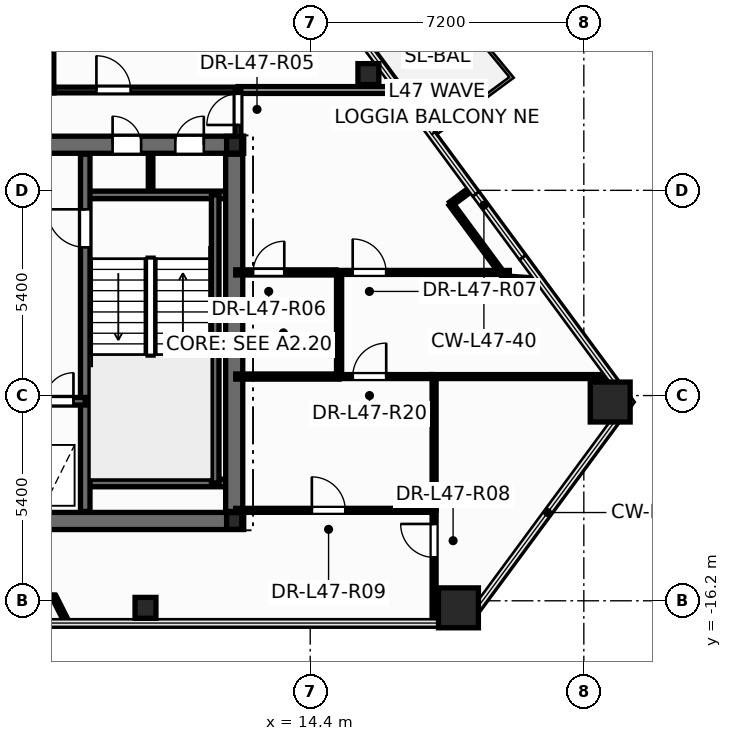
"""IFC4 building model, lengths in metres.
Left out: names, types, materials, properties, quantities, classifications, styles, units other than length and angle.
Written with IfcOpenShell. Run it as: python <this file> out.ifc"""

import sys

from ifc_helpers import new_model, si_unit, direction, frame, frame_2d, origin, origin_2d, place, context, subcontext, project, spatial, rectangle, hollow_rectangle, hollow_circle, i_section, extrude, element, fill, save


model = new_model("IFC4")
c1 = context("Model", 3, precision=1e-05, world=origin(), true_north=direction((0.0, 1.0)))
c2 = subcontext(c1, "Body", "Model", "MODEL_VIEW")
j1 = project(units=[si_unit("LENGTHUNIT", "METRE"), si_unit("PLANEANGLEUNIT", "RADIAN")], contexts=[c1])
p1 = place(None, origin())
s1 = spatial("IfcSite", under=j1, at=p1, CompositionType="ELEMENT")
p2 = place(p1, origin())
s2 = spatial("IfcBuilding", under=s1, at=p2, CompositionType="ELEMENT")
p3 = place(p2, frame((0.0, 0.0, 182.1)))
s3 = spatial("IfcBuildingStorey", under=s2, at=p3, CompositionType="ELEMENT", Elevation=182.1)
for number, where, z_axis, x_axis in (
    (1, (18.301, -16.385, 0.0), (0.0, 0.0, 1.0), (1.0, 0.0, 0.0)),
    (2, (22.294, -10.97, 0.0), (0.0, 0.0, 1.0), (1.0, 0.0, 0.0)),
):
    element("IfcColumn", number, at=place(p3, frame(where, z_axis=z_axis, x_axis=x_axis)), inside=s3, PredefinedType="COLUMN", context=c2, shape_type="SweptSolid", body=[
        extrude(hollow_rectangle(XDim=1.05, YDim=1.05, WallThickness=0.045, at=origin_2d()), origin(), (0.0, 0.0, 1.0), 3.6),
    ])
for number, where, z_axis, x_axis in (
    (3, (10.065, -16.385, 0.0), (0.0, 0.0, 1.0), (1.0, 0.0, 0.0)),
    (4, (15.931, -2.341, 0.0), (0.0, 0.0, 1.0), (1.0, 0.0, 0.0)),
):
    element("IfcColumn", number, at=place(p3, frame(where, z_axis=z_axis, x_axis=x_axis)), inside=s3, PredefinedType="COLUMN", context=c2, shape_type="SweptSolid", body=[
        extrude(hollow_circle(Radius=0.275, WallThickness=0.024, at=origin_2d()), origin(), (0.0, 0.0, 1.0), 3.6),
    ])
for number, where, z_axis, x_axis in (
    (5, (12.4, -14.1, 0.0), (0.0, 0.0, 1.0), (1.0, 0.0, 0.0)),
    (6, (12.4, -4.2, 0.0), (0.0, 0.0, 1.0), (1.0, 0.0, 0.0)),
):
    element("IfcColumn", number, at=place(p3, frame(where, z_axis=z_axis, x_axis=x_axis)), inside=s3, PredefinedType="COLUMN", context=c2, shape_type="SweptSolid", body=[
        extrude(i_section(OverallWidth=0.4, OverallDepth=0.44, WebThickness=0.028, FlangeThickness=0.04, at=origin_2d()), origin(), (0.0, 0.0, 1.0), 3.6),
    ])
p4 = place(p3, frame((10.2, -5.52, 0.0), z_axis=(0.0, 0.0, 1.0), x_axis=(0.0, 1.0, 0.0)))
e7 = element("IfcWall", 7, at=p4, inside=s3, PredefinedType="PARTITIONING", context=c2, shape_type="SweptSolid", body=[
    extrude(rectangle(XDim=1.12, YDim=0.12, at=frame_2d((0.56, 0.0))), origin(), (0.0, 0.0, 1.0), 3.35),
])
p5 = place(p3, frame((-12.65, -14.1, 0.0), z_axis=(0.0, 0.0, 1.0), x_axis=(1.0, 0.0, 0.0)))
e8 = element("IfcWall", 8, at=p5, inside=s3, PredefinedType="SHEAR", context=c2, shape_type="SweptSolid", body=[
    extrude(rectangle(XDim=25.3, YDim=0.45, at=frame_2d((12.65, 0.0))), origin(), (0.0, 0.0, 1.0), 3.6),
])
p6 = place(p3, frame((-12.65, -4.2, 0.0), z_axis=(0.0, 0.0, 1.0), x_axis=(1.0, 0.0, 0.0)))
e9 = element("IfcWall", 9, at=p6, inside=s3, PredefinedType="SHEAR", context=c2, shape_type="SweptSolid", body=[
    extrude(rectangle(XDim=25.3, YDim=0.45, at=frame_2d((12.65, 0.0))), origin(), (0.0, 0.0, 1.0), 3.6),
])
p7 = place(p6, frame((0.95, 0.0, 0.0)))
e10 = element("IfcOpeningElement", 10, at=p7, cuts=e9, PredefinedType="OPENING", context=c2, shape_type="SweptSolid", body=[
    extrude(rectangle(XDim=0.756, YDim=2.054, at=frame_2d((0.375, 1.027))), frame((0.0, 0.235, 0.0), z_axis=(0.0, -1.0, 0.0), x_axis=(1.0, 0.0, 0.0)), (0.0, 0.0, 1.0), 0.47),
])
p8 = place(p6, frame((2.6, 0.0, 0.0)))
e11 = element("IfcOpeningElement", 11, at=p8, cuts=e9, PredefinedType="OPENING", context=c2, shape_type="SweptSolid", body=[
    extrude(rectangle(XDim=0.756, YDim=2.054, at=frame_2d((0.375, 1.027))), frame((0.0, 0.235, 0.0), z_axis=(0.0, -1.0, 0.0), x_axis=(1.0, 0.0, 0.0)), (0.0, 0.0, 1.0), 0.47),
])
p9 = place(p6, frame((21.85, 0.0, 0.0)))
e12 = element("IfcOpeningElement", 12, at=p9, cuts=e9, PredefinedType="OPENING", context=c2, shape_type="SweptSolid", body=[
    extrude(rectangle(XDim=0.756, YDim=2.054, at=frame_2d((0.375, 1.027))), frame((0.0, 0.235, 0.0), z_axis=(0.0, -1.0, 0.0), x_axis=(1.0, 0.0, 0.0)), (0.0, 0.0, 1.0), 0.47),
])
p10 = place(p6, frame((23.5, 0.0, 0.0)))
e13 = element("IfcOpeningElement", 13, at=p10, cuts=e9, PredefinedType="OPENING", context=c2, shape_type="SweptSolid", body=[
    extrude(rectangle(XDim=0.756, YDim=2.054, at=frame_2d((0.375, 1.027))), frame((0.0, 0.235, 0.0), z_axis=(0.0, -1.0, 0.0), x_axis=(1.0, 0.0, 0.0)), (0.0, 0.0, 1.0), 0.47),
])
p11 = place(p6, frame((5.85, 0.0, 0.0)))
e14 = element("IfcOpeningElement", 14, at=p11, cuts=e9, PredefinedType="OPENING", context=c2, shape_type="SweptSolid", body=[
    extrude(rectangle(XDim=1.006, YDim=2.104, at=frame_2d((0.5, 1.052))), frame((0.0, 0.235, 0.0), z_axis=(0.0, -1.0, 0.0), x_axis=(1.0, 0.0, 0.0)), (0.0, 0.0, 1.0), 0.47),
])
p12 = place(p6, frame((10.35, 0.0, 0.0)))
e15 = element("IfcOpeningElement", 15, at=p12, cuts=e9, PredefinedType="OPENING", context=c2, shape_type="SweptSolid", body=[
    extrude(rectangle(XDim=1.406, YDim=2.154, at=frame_2d((0.7, 1.077))), frame((0.0, 0.235, 0.0), z_axis=(0.0, -1.0, 0.0), x_axis=(1.0, 0.0, 0.0)), (0.0, 0.0, 1.0), 0.47),
])
p13 = place(p6, frame((18.45, 0.0, 0.0)))
e16 = element("IfcOpeningElement", 16, at=p13, cuts=e9, PredefinedType="OPENING", context=c2, shape_type="SweptSolid", body=[
    extrude(rectangle(XDim=1.006, YDim=2.104, at=frame_2d((0.5, 1.052))), frame((0.0, 0.235, 0.0), z_axis=(0.0, -1.0, 0.0), x_axis=(1.0, 0.0, 0.0)), (0.0, 0.0, 1.0), 0.47),
])
for number, where, z_axis, x_axis in (
    (17, (8.48, -5.52, 0.0), (0.0, 0.0, 1.0), (1.0, 0.0, 0.0)),
    (18, (8.48, -13.1, 0.0), (0.0, 0.0, 1.0), (1.0, 0.0, 0.0)),
):
    element("IfcWall", number, at=place(p3, frame(where, z_axis=z_axis, x_axis=x_axis)), inside=s3, PredefinedType="SOLIDWALL", context=c2, shape_type="SweptSolid", body=[
        extrude(rectangle(XDim=3.87, YDim=0.2, at=frame_2d((1.935, 0.0))), origin(), (0.0, 0.0, 1.0), 3.6),
    ])
p14 = place(p3, frame((11.9, -13.1, 0.0), z_axis=(0.0, 0.0, 1.0), x_axis=(0.0, 1.0, 0.0)))
e19 = element("IfcWall", 19, at=p14, inside=s3, PredefinedType="SOLIDWALL", context=c2, shape_type="SweptSolid", body=[
    extrude(rectangle(XDim=7.58, YDim=0.2, at=frame_2d((3.79, 0.0))), origin(), (0.0, 0.0, 1.0), 3.6),
])
p15 = place(p3, frame((8.48, -13.85, 0.0), z_axis=(0.0, 0.0, 1.0), x_axis=(0.0, 1.0, 0.0)))
e20 = element("IfcWall", 20, at=p15, inside=s3, PredefinedType="SHEAR", context=c2, shape_type="SweptSolid", body=[
    extrude(rectangle(XDim=9.4, YDim=0.25, at=frame_2d((4.7, 0.0))), origin(), (0.0, 0.0, 1.0), 3.6),
])
p16 = place(p15, frame((6.95, 0.0, 0.0)))
e21 = element("IfcOpeningElement", 21, at=p16, cuts=e20, PredefinedType="OPENING", context=c2, shape_type="SweptSolid", body=[
    extrude(rectangle(XDim=1.006, YDim=2.104, at=frame_2d((0.5, 1.052))), frame((0.0, 0.135, 0.0), z_axis=(0.0, -1.0, 0.0), x_axis=(1.0, 0.0, 0.0)), (0.0, 0.0, 1.0), 0.27),
])
p17 = place(p3, frame((5.12, -10.95, 0.0), z_axis=(0.0, 0.0, 1.0), x_axis=(1.0, 0.0, 0.0)))
e22 = element("IfcWall", 22, at=p17, inside=s3, PredefinedType="SOLIDWALL", context=c2, shape_type="SweptSolid", body=[
    extrude(rectangle(XDim=3.36, YDim=0.2, at=frame_2d((1.68, 0.0))), origin(), (0.0, 0.0, 1.0), 3.6),
])
p18 = place(p17, frame((0.42, 0.0, 0.0)))
e23 = element("IfcOpeningElement", 23, at=p18, cuts=e22, PredefinedType="OPENING", context=c2, shape_type="SweptSolid", body=[
    extrude(rectangle(XDim=1.106, YDim=2.104, at=frame_2d((0.55, 1.052))), frame((0.0, 0.11, 0.0), z_axis=(0.0, -1.0, 0.0), x_axis=(1.0, 0.0, 0.0)), (0.0, 0.0, 1.0), 0.22),
])
p19 = place(p17, frame((2.3, 0.0, 0.0)))
e24 = element("IfcOpeningElement", 24, at=p19, cuts=e22, PredefinedType="OPENING", context=c2, shape_type="SweptSolid", body=[
    extrude(rectangle(XDim=0.756, YDim=2.054, at=frame_2d((0.375, 1.027))), frame((0.0, 0.11, 0.0), z_axis=(0.0, -1.0, 0.0), x_axis=(1.0, 0.0, 0.0)), (0.0, 0.0, 1.0), 0.22),
])
p20 = place(p3, frame((12.4, -13.85, 0.0), z_axis=(0.0, 0.0, 1.0), x_axis=(0.0, 1.0, 0.0)))
e25 = element("IfcWall", 25, at=p20, inside=s3, PredefinedType="SHEAR", context=c2, shape_type="SweptSolid", body=[
    extrude(rectangle(XDim=9.4, YDim=0.45, at=frame_2d((4.7, 0.0))), origin(), (0.0, 0.0, 1.0), 3.6),
])
p21 = place(p3, frame((7.6, -2.76, 0.0), z_axis=(0.0, 0.0, 1.0), x_axis=(0.0, 1.0, 0.0)))
e26 = element("IfcWall", 26, at=p21, inside=s3, PredefinedType="PARTITIONING", context=c2, shape_type="SweptSolid", body=[
    extrude(rectangle(XDim=6.96, YDim=0.105, at=frame_2d((3.48, 0.0))), origin(), (0.0, 0.0, 1.0), 2.325),
])
p22 = place(p3, frame((2.36, -2.76, 0.0), z_axis=(0.0, 0.0, 1.0), x_axis=(1.0, 0.0, 0.0)))
e27 = element("IfcWall", 27, at=p22, inside=s3, PredefinedType="PARTITIONING", context=c2, shape_type="SweptSolid", body=[
    extrude(rectangle(XDim=5.3, YDim=0.15, at=frame_2d((2.65, 0.0))), origin(), (0.0, 0.0, 1.0), 2.325),
])
p23 = place(p3, frame((12.44, -13.82, 0.0), z_axis=(0.0, 0.0, 1.0), x_axis=(1.0, 0.0, 0.0)))
e28 = element("IfcWall", 28, at=p23, inside=s3, PredefinedType="PARTITIONING", context=c2, shape_type="SweptSolid", body=[
    extrude(rectangle(XDim=5.22, YDim=0.105, at=frame_2d((2.61, 0.0))), origin(), (0.0, 0.0, 1.0), 2.792),
])
p24 = place(p23, frame((2.003, 0.0, 0.0)))
e29 = element("IfcOpeningElement", 29, at=p24, cuts=e28, PredefinedType="OPENING", context=c2, shape_type="SweptSolid", body=[
    extrude(rectangle(XDim=0.886, YDim=2.104, at=frame_2d((0.44, 1.052))), frame((0.0, 0.062, 0.0), z_axis=(0.0, -1.0, 0.0), x_axis=(1.0, 0.0, 0.0)), (0.0, 0.0, 1.0), 0.125),
])
p25 = place(p3, frame((7.662, -2.76, 0.0), z_axis=(0.0, 0.0, 1.0), x_axis=(1.0, 0.0, 0.0)))
e30 = element("IfcWall", 30, at=p25, inside=s3, PredefinedType="PARTITIONING", context=c2, shape_type="SweptSolid", body=[
    extrude(rectangle(XDim=4.838, YDim=0.15, at=frame_2d((2.419, 0.0))), origin(), (0.0, 0.0, 1.0), 3.35),
])
p26 = place(p25, frame((1.112, 0.0, 0.0)))
e31 = element("IfcOpeningElement", 31, at=p26, cuts=e30, PredefinedType="OPENING", context=c2, shape_type="SweptSolid", body=[
    extrude(rectangle(XDim=0.906, YDim=2.104, at=frame_2d((0.45, 1.052))), frame((0.0, 0.085, 0.0), z_axis=(0.0, -1.0, 0.0), x_axis=(1.0, 0.0, 0.0)), (0.0, 0.0, 1.0), 0.17),
])
p27 = place(p3, frame((17.6, -10.3, 0.0), z_axis=(0.0, 0.0, 1.0), x_axis=(1.0, 0.0, 0.0)))
e32 = element("IfcWall", 32, at=p27, inside=s3, PredefinedType="PARTITIONING", context=c2, shape_type="SweptSolid", body=[
    extrude(rectangle(XDim=4.697, YDim=0.105, at=frame_2d((2.348, 0.0))), origin(), (0.0, 0.0, 1.0), 2.325),
])
p28 = place(p3, frame((15.08, -7.56, 0.0), z_axis=(0.0, 0.0, 1.0), x_axis=(1.0, 0.0, 0.0)))
e33 = element("IfcWall", 33, at=p28, inside=s3, PredefinedType="PARTITIONING", context=c2, shape_type="SweptSolid", body=[
    extrude(rectangle(XDim=4.56, YDim=0.105, at=frame_2d((2.28, 0.0))), origin(), (0.0, 0.0, 1.0), 2.325),
])
p29 = place(p28, frame((0.438, 0.0, 0.0)))
e34 = element("IfcOpeningElement", 34, at=p29, cuts=e33, PredefinedType="OPENING", context=c2, shape_type="SweptSolid", body=[
    extrude(rectangle(XDim=0.886, YDim=2.104, at=frame_2d((0.44, 1.052))), frame((0.0, 0.062, 0.0), z_axis=(0.0, -1.0, 0.0), x_axis=(1.0, 0.0, 0.0)), (0.0, 0.0, 1.0), 0.125),
])
p30 = place(p3, frame((3.241, -16.106, 0.0), z_axis=(0.0, 0.0, 1.0), x_axis=(1.0, 0.0, 0.0)))
e35 = element("IfcWall", 35, at=p30, inside=s3, PredefinedType="PARTITIONING", context=c2, shape_type="SweptSolid", body=[
    extrude(rectangle(XDim=4.422, YDim=0.12, at=frame_2d((2.211, 0.0))), origin(), (0.0, 0.0, 1.0), 2.325),
])
p31 = place(p3, frame((12.5, -2.76, 0.0), z_axis=(0.0, 0.0, 1.0), x_axis=(1.0, 0.0, 0.0)))
e36 = element("IfcWall", 36, at=p31, inside=s3, PredefinedType="PARTITIONING", context=c2, shape_type="SweptSolid", body=[
    extrude(rectangle(XDim=4.237, YDim=0.18, at=frame_2d((2.118, 0.0))), origin(), (0.0, 0.0, 1.0), 2.325),
])
p32 = place(p3, frame((17.66, -13.82, 0.0), z_axis=(0.0, 0.0, 1.0), x_axis=(0.0, 1.0, 0.0)))
e37 = element("IfcWall", 37, at=p32, inside=s3, PredefinedType="PARTITIONING", context=c2, shape_type="SweptSolid", body=[
    extrude(rectangle(XDim=3.52, YDim=0.105, at=frame_2d((1.76, 0.0))), origin(), (0.0, 0.0, 1.0), 3.35),
])
p33 = place(p3, frame((17.66, -16.786, 0.0), z_axis=(0.0, 0.0, 1.0), x_axis=(0.0, 1.0, 0.0)))
e38 = element("IfcWall", 38, at=p33, inside=s3, PredefinedType="PARTITIONING", context=c2, shape_type="SweptSolid", body=[
    extrude(rectangle(XDim=2.966, YDim=0.105, at=frame_2d((1.483, 0.0))), origin(), (0.0, 0.0, 1.0), 2.24),
])
p34 = place(p33, frame((1.727, 0.0, 0.0)))
e39 = element("IfcOpeningElement", 39, at=p34, cuts=e38, PredefinedType="OPENING", context=c2, shape_type="SweptSolid", body=[
    extrude(rectangle(XDim=0.886, YDim=2.104, at=frame_2d((0.44, 1.052))), frame((0.0, 0.062, 0.0), z_axis=(0.0, -1.0, 0.0), x_axis=(1.0, 0.0, 0.0)), (0.0, 0.0, 1.0), 0.125),
])
p35 = place(p3, frame((12.44, -7.56, 0.0), z_axis=(0.0, 0.0, 1.0), x_axis=(1.0, 0.0, 0.0)))
e40 = element("IfcWall", 40, at=p35, inside=s3, PredefinedType="PARTITIONING", context=c2, shape_type="SweptSolid", body=[
    extrude(rectangle(XDim=2.638, YDim=0.135, at=frame_2d((1.319, 0.0))), origin(), (0.0, 0.0, 1.0), 2.792),
])
p36 = place(p35, frame((0.458, 0.0, 0.0)))
e41 = element("IfcOpeningElement", 41, at=p36, cuts=e40, PredefinedType="OPENING", context=c2, shape_type="SweptSolid", body=[
    extrude(rectangle(XDim=0.826, YDim=2.104, at=frame_2d((0.41, 1.052))), frame((0.0, 0.078, 0.0), z_axis=(0.0, -1.0, 0.0), x_axis=(1.0, 0.0, 0.0)), (0.0, 0.0, 1.0), 0.155),
])
p37 = place(p3, frame((15.16, -10.3, 0.0), z_axis=(0.0, 0.0, 1.0), x_axis=(0.0, 1.0, 0.0)))
e42 = element("IfcWall", 42, at=p37, inside=s3, PredefinedType="PARTITIONING", context=c2, shape_type="SweptSolid", body=[
    extrude(rectangle(XDim=2.74, YDim=0.135, at=frame_2d((1.37, 0.0))), origin(), (0.0, 0.0, 1.0), 3.35),
])
p38 = place(p3, frame((12.44, -10.3, 0.0), z_axis=(0.0, 0.0, 1.0), x_axis=(1.0, 0.0, 0.0)))
e43 = element("IfcWall", 43, at=p38, inside=s3, PredefinedType="PARTITIONING", context=c2, shape_type="SweptSolid", body=[
    extrude(rectangle(XDim=2.72, YDim=0.135, at=frame_2d((1.36, 0.0))), origin(), (0.0, 0.0, 1.0), 2.792),
])
p39 = place(p3, frame((15.16, -10.3, 0.0), z_axis=(0.0, 0.0, 1.0), x_axis=(1.0, 0.0, 0.0)))
e44 = element("IfcWall", 44, at=p39, inside=s3, PredefinedType="PARTITIONING", context=c2, shape_type="SweptSolid", body=[
    extrude(rectangle(XDim=2.438, YDim=0.105, at=frame_2d((1.219, 0.0))), origin(), (0.0, 0.0, 1.0), 3.35),
])
p40 = place(p39, frame((0.36, 0.0, 0.0)))
e45 = element("IfcOpeningElement", 45, at=p40, cuts=e44, PredefinedType="OPENING", context=c2, shape_type="SweptSolid", body=[
    extrude(rectangle(XDim=0.886, YDim=2.104, at=frame_2d((0.44, 1.052))), frame((0.0, 0.062, 0.0), z_axis=(0.0, -1.0, 0.0), x_axis=(1.0, 0.0, 0.0)), (0.0, 0.0, 1.0), 0.125),
])
p41 = place(p3, frame((19.544, -7.713, 0.0), z_axis=(0.0, 0.0, 1.0), x_axis=(-0.593582816838, 0.804772911793, 0.0)))
e46 = element("IfcWall", 46, at=p41, inside=s3, PredefinedType="PARTITIONING", context=c2, shape_type="SweptSolid", body=[
    extrude(rectangle(XDim=2.43, YDim=0.12, at=frame_2d((1.215, 0.0))), origin(), (0.0, 0.0, 1.0), 3.35),
])
p42 = place(p3, frame((12.5, -4.24, 0.0), z_axis=(0.0, 0.0, 1.0), x_axis=(0.0, 1.0, 0.0)))
e47 = element("IfcWall", 47, at=p42, inside=s3, PredefinedType="PARTITIONING", context=c2, shape_type="SweptSolid", body=[
    extrude(rectangle(XDim=1.48, YDim=0.15, at=frame_2d((0.74, 0.0))), origin(), (0.0, 0.0, 1.0), 2.325),
])
p43 = place(p42, frame((0.56, 0.0, 0.0)))
e48 = element("IfcOpeningElement", 48, at=p43, cuts=e47, PredefinedType="OPENING", context=c2, shape_type="SweptSolid", body=[
    extrude(rectangle(XDim=0.826, YDim=2.104, at=frame_2d((0.41, 1.052))), frame((0.0, 0.085, 0.0), z_axis=(0.0, -1.0, 0.0), x_axis=(1.0, 0.0, 0.0)), (0.0, 0.0, 1.0), 0.17),
])
p44 = place(p3, frame((20.422, -7.775, 0.0), z_axis=(0.0, 0.0, 1.0), x_axis=(-0.997514712132, 0.070458491903, 0.0)))
e49 = element("IfcWall", 49, at=p44, inside=s3, PredefinedType="PARTITIONING", context=c2, shape_type="SweptSolid", body=[
    extrude(rectangle(XDim=0.88, YDim=0.12, at=frame_2d((0.44, 0.0))), origin(), (0.0, 0.0, 1.0), 2.792),
])
p45 = place(p3, frame((7.663, -16.106, 0.0), z_axis=(0.0, 0.0, 1.0), x_axis=(0.449555870508, -0.893252214826, 0.0)))
e50 = element("IfcWall", 50, at=p45, inside=s3, PredefinedType="PARTITIONING", context=c2, shape_type="SweptSolid", body=[
    extrude(rectangle(XDim=0.75, YDim=0.12, at=frame_2d((0.375, 0.0))), origin(), (0.0, 0.0, 1.0), 2.325),
])
p46 = place(p3, frame((18.102, -5.757, 0.0), z_axis=(0.0, 0.0, 1.0), x_axis=(0.804826838501, 0.593509696659, 0.0)))
e51 = element("IfcWall", 51, at=p46, inside=s3, PredefinedType="PARTITIONING", context=c2, shape_type="SweptSolid", body=[
    extrude(rectangle(XDim=0.67, YDim=0.12, at=frame_2d((0.335, 0.0))), origin(), (0.0, 0.0, 1.0), 2.792),
])
p47 = place(p16, origin())
e52 = element("IfcDoor", 52, at=p47, inside=s3, OperationType="SINGLE_SWING_RIGHT", PredefinedType="DOOR", context=c2, shape_type="SweptSolid", body=[
    extrude(rectangle(XDim=1.0, YDim=2.1, at=frame_2d((0.5, 1.05))), frame((0.0, 0.025, 0.0), z_axis=(0.0, -1.0, 0.0), x_axis=(1.0, 0.0, 0.0)), (0.0, 0.0, 1.0), 0.05),
])
fill(e21, e52)
p48 = place(p19, origin())
e53 = element("IfcDoor", 53, at=p48, inside=s3, OperationType="SINGLE_SWING_RIGHT", PredefinedType="DOOR", context=c2, shape_type="SweptSolid", body=[
    extrude(rectangle(XDim=0.75, YDim=2.05, at=frame_2d((0.375, 1.025))), frame((0.0, 0.025, 0.0), z_axis=(0.0, -1.0, 0.0), x_axis=(1.0, 0.0, 0.0)), (0.0, 0.0, 1.0), 0.05),
])
fill(e24, e53)
p49 = place(p9, origin())
e54 = element("IfcDoor", 54, at=p49, inside=s3, OperationType="SINGLE_SWING_LEFT", PredefinedType="DOOR", context=c2, shape_type="SweptSolid", body=[
    extrude(rectangle(XDim=0.75, YDim=2.05, at=frame_2d((0.375, 1.025))), frame((0.0, 0.025, 0.0), z_axis=(0.0, -1.0, 0.0), x_axis=(1.0, 0.0, 0.0)), (0.0, 0.0, 1.0), 0.05),
])
fill(e12, e54)
p50 = place(p10, origin())
e55 = element("IfcDoor", 55, at=p50, inside=s3, OperationType="SINGLE_SWING_RIGHT", PredefinedType="DOOR", context=c2, shape_type="SweptSolid", body=[
    extrude(rectangle(XDim=0.75, YDim=2.05, at=frame_2d((0.375, 1.025))), frame((0.0, 0.025, 0.0), z_axis=(0.0, -1.0, 0.0), x_axis=(1.0, 0.0, 0.0)), (0.0, 0.0, 1.0), 0.05),
])
fill(e13, e55)
p51 = place(p43, origin())
e56 = element("IfcDoor", 56, at=p51, inside=s3, OperationType="SINGLE_SWING_LEFT", PredefinedType="DOOR", context=c2, shape_type="SweptSolid", body=[
    extrude(rectangle(XDim=0.82, YDim=2.1, at=frame_2d((0.41, 1.05))), frame((0.0, 0.025, 0.0), z_axis=(0.0, -1.0, 0.0), x_axis=(1.0, 0.0, 0.0)), (0.0, 0.0, 1.0), 0.05),
])
fill(e48, e56)
p52 = place(p36, origin())
e57 = element("IfcDoor", 57, at=p52, inside=s3, OperationType="SINGLE_SWING_RIGHT", PredefinedType="DOOR", context=c2, shape_type="SweptSolid", body=[
    extrude(rectangle(XDim=0.82, YDim=2.1, at=frame_2d((0.41, 1.05))), frame((0.0, 0.025, 0.0), z_axis=(0.0, -1.0, 0.0), x_axis=(1.0, 0.0, 0.0)), (0.0, 0.0, 1.0), 0.05),
])
fill(e41, e57)
p53 = place(p29, origin())
e58 = element("IfcDoor", 58, at=p53, inside=s3, OperationType="SINGLE_SWING_LEFT", PredefinedType="DOOR", context=c2, shape_type="SweptSolid", body=[
    extrude(rectangle(XDim=0.88, YDim=2.1, at=frame_2d((0.44, 1.05))), frame((0.0, 0.025, 0.0), z_axis=(0.0, -1.0, 0.0), x_axis=(1.0, 0.0, 0.0)), (0.0, 0.0, 1.0), 0.05),
])
fill(e34, e58)
p54 = place(p34, origin())
e59 = element("IfcDoor", 59, at=p54, inside=s3, OperationType="SINGLE_SWING_RIGHT", PredefinedType="DOOR", context=c2, shape_type="SweptSolid", body=[
    extrude(rectangle(XDim=0.88, YDim=2.1, at=frame_2d((0.44, 1.05))), frame((0.0, 0.025, 0.0), z_axis=(0.0, -1.0, 0.0), x_axis=(1.0, 0.0, 0.0)), (0.0, 0.0, 1.0), 0.05),
])
fill(e39, e59)
p55 = place(p24, origin())
e60 = element("IfcDoor", 60, at=p55, inside=s3, OperationType="SINGLE_SWING_LEFT", PredefinedType="DOOR", context=c2, shape_type="SweptSolid", body=[
    extrude(rectangle(XDim=0.88, YDim=2.1, at=frame_2d((0.44, 1.05))), frame((0.0, 0.025, 0.0), z_axis=(0.0, -1.0, 0.0), x_axis=(1.0, 0.0, 0.0)), (0.0, 0.0, 1.0), 0.05),
])
fill(e29, e60)
p56 = place(p26, origin())
e61 = element("IfcDoor", 61, at=p56, inside=s3, OperationType="SINGLE_SWING_LEFT", PredefinedType="DOOR", context=c2, shape_type="SweptSolid", body=[
    extrude(rectangle(XDim=0.9, YDim=2.1, at=frame_2d((0.45, 1.05))), frame((0.0, 0.025, 0.0), z_axis=(0.0, -1.0, 0.0), x_axis=(1.0, 0.0, 0.0)), (0.0, 0.0, 1.0), 0.05),
])
fill(e31, e61)
p57 = place(p40, origin())
e62 = element("IfcDoor", 62, at=p57, inside=s3, OperationType="SINGLE_SWING_RIGHT", PredefinedType="DOOR", context=c2, shape_type="SweptSolid", body=[
    extrude(rectangle(XDim=0.88, YDim=2.1, at=frame_2d((0.44, 1.05))), frame((0.0, 0.025, 0.0), z_axis=(0.0, -1.0, 0.0), x_axis=(1.0, 0.0, 0.0)), (0.0, 0.0, 1.0), 0.05),
])
fill(e45, e62)
save(model, sys.argv[1])
